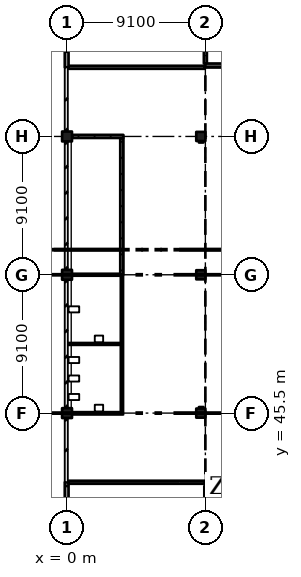
"""IFC4 building model, lengths in metres.
Left out: names, types, materials, properties, quantities, classifications, styles, units other than length and angle.
Written with IfcOpenShell. Run it as: python <this file> out.ifc"""

import sys

from ifc_helpers import new_model, si_unit, direction, frame, frame_2d, origin, origin_2d, place, context, subcontext, project, spatial, rectangle, extrude, element, fill, save


model = new_model("IFC4")
c1 = context("Model", 3, precision=1e-05, world=origin(), true_north=direction((0.0, 1.0)))
c2 = subcontext(c1, "Body", "Model", "MODEL_VIEW")
j1 = project(units=[si_unit("LENGTHUNIT", "METRE"), si_unit("PLANEANGLEUNIT", "RADIAN")], contexts=[c1])
p1 = place(None, origin())
s1 = spatial("IfcSite", under=j1, at=p1, CompositionType="ELEMENT")
p2 = place(p1, origin())
s2 = spatial("IfcBuilding", under=s1, at=p2, CompositionType="ELEMENT")
p3 = place(p2, frame((0.0, 0.0, 24.57)))
s3 = spatial("IfcBuildingStorey", under=s2, at=p3, CompositionType="ELEMENT", Elevation=24.57)
for number, where, z_axis, x_axis in (
    (1, (0.0, 45.5, 0.0), (0.0, 0.0, 1.0), (1.0, 0.0, 0.0)),
    (2, (0.0, 54.6, 0.0), (0.0, 0.0, 1.0), (1.0, 0.0, 0.0)),
    (3, (0.0, 63.7, 0.0), (0.0, 0.0, 1.0), (1.0, 0.0, 0.0)),
):
    element("IfcColumn", number, at=place(p3, frame(where, z_axis=z_axis, x_axis=x_axis)), inside=s3, PredefinedType="COLUMN", context=c2, shape_type="SweptSolid", body=[
        extrude(rectangle(XDim=0.65, YDim=0.65, at=origin_2d()), origin(), (0.0, 0.0, 1.0), 4.55),
    ])
for number, where, z_axis, x_axis in (
    (4, (8.8, 45.5, 0.0), (0.0, 0.0, 1.0), (1.0, 0.0, 0.0)),
    (5, (8.8, 54.6, 0.0), (0.0, 0.0, 1.0), (1.0, 0.0, 0.0)),
    (6, (8.8, 63.7, 0.0), (0.0, 0.0, 1.0), (1.0, 0.0, 0.0)),
):
    element("IfcColumn", number, at=place(p3, frame(where, z_axis=z_axis, x_axis=x_axis)), inside=s3, PredefinedType="COLUMN", context=c2, shape_type="SweptSolid", body=[
        extrude(rectangle(XDim=0.6, YDim=0.6, at=origin_2d()), origin(), (0.0, 0.0, 1.0), 4.55),
    ])
for number, where, z_axis, x_axis in (
    (7, (40.95, 40.825, 0.0), (0.0, 0.0, 1.0), (-1.0, 0.0, 0.0)),
    (8, (40.95, 68.375, 0.0), (0.0, 0.0, 1.0), (-1.0, 0.0, 0.0)),
):
    element("IfcWall", number, at=place(p3, frame(where, z_axis=z_axis, x_axis=x_axis)), inside=s3, PredefinedType="SHEAR", context=c2, shape_type="SweptSolid", body=[
        extrude(rectangle(XDim=31.85, YDim=0.25, at=frame_2d((15.925, 0.0))), origin(), (0.0, 0.0, 1.0), 4.55),
    ])
for number, where, z_axis, x_axis in (
    (9, (-0.025, 72.55, 0.0), (0.0, 0.0, 1.0), (0.0, -1.0, 0.0)),
    (10, (-0.025, 40.95, 0.0), (0.0, 0.0, 1.0), (0.0, -1.0, 0.0)),
):
    element("IfcWall", number, at=place(p3, frame(where, z_axis=z_axis, x_axis=x_axis)), inside=s3, PredefinedType="SOLIDWALL", context=c2, shape_type="SweptSolid", body=[
        extrude(rectangle(XDim=4.3, YDim=0.25, at=frame_2d((2.15, 0.0))), origin(), (0.0, 0.0, 1.0), 3.6),
    ])
p4 = place(p3, frame((0.03, 50.05, 0.0), z_axis=(0.0, 0.0, 1.0), x_axis=(1.0, 0.0, 0.0)))
e11 = element("IfcWall", 11, at=p4, inside=s3, PredefinedType="PARTITIONING", context=c2, shape_type="SweptSolid", body=[
    extrude(rectangle(XDim=3.508, YDim=0.125, at=frame_2d((1.754, 0.0))), origin(), (0.0, 0.0, 1.0), 3.9),
])
p5 = place(p3, frame((0.1, 40.95, 0.0), z_axis=(0.0, 0.0, 1.0), x_axis=(1.0, 0.0, 0.0)))
e12 = element("IfcWall", 12, at=p5, inside=s3, PredefinedType="PARTITIONING", context=c2, shape_type="SweptSolid", body=[
    extrude(rectangle(XDim=8.97, YDim=0.2, at=frame_2d((4.485, 0.0))), origin(), (0.0, 0.0, 1.0), 3.55),
])
p6 = place(p5, frame((4.75, 0.0, 0.0)))
e13 = element("IfcOpeningElement", 13, at=p6, cuts=e12, PredefinedType="OPENING", context=c2, shape_type="SweptSolid", body=[
    extrude(rectangle(XDim=3.0, YDim=2.4, at=frame_2d((1.5, 1.2))), frame((0.0, 0.11, 0.0), z_axis=(0.0, -1.0, 0.0), x_axis=(1.0, 0.0, 0.0)), (0.0, 0.0, 1.0), 0.22),
])
p7 = place(p5, frame((0.25, 0.0, 0.0)))
e14 = element("IfcOpeningElement", 14, at=p7, cuts=e12, PredefinedType="OPENING", context=c2, shape_type="SweptSolid", body=[
    extrude(rectangle(XDim=3.0, YDim=2.4, at=frame_2d((1.5, 1.2))), frame((0.0, 0.11, 0.0), z_axis=(0.0, -1.0, 0.0), x_axis=(1.0, 0.0, 0.0)), (0.0, 0.0, 1.0), 0.22),
])
p8 = place(p3, frame((0.325, 45.5, 0.0), z_axis=(0.0, 0.0, 1.0), x_axis=(1.0, 0.0, 0.0)))
e15 = element("IfcWall", 15, at=p8, inside=s3, PredefinedType="PARTITIONING", context=c2, shape_type="SweptSolid", body=[
    extrude(rectangle(XDim=3.338, YDim=0.125, at=frame_2d((1.669, 0.0))), origin(), (0.0, 0.0, 1.0), 3.9),
])
p9 = place(p3, frame((0.325, 54.6, 0.0), z_axis=(0.0, 0.0, 1.0), x_axis=(1.0, 0.0, 0.0)))
e16 = element("IfcWall", 16, at=p9, inside=s3, PredefinedType="PARTITIONING", context=c2, shape_type="SweptSolid", body=[
    extrude(rectangle(XDim=3.175, YDim=0.125, at=frame_2d((1.587, 0.0))), origin(), (0.0, 0.0, 1.0), 3.9),
])
p10 = place(p3, frame((3.6, 45.562, 0.0), z_axis=(0.0, 0.0, 1.0), x_axis=(0.0, 1.0, 0.0)))
e17 = element("IfcWall", 17, at=p10, inside=s3, PredefinedType="PARTITIONING", context=c2, shape_type="SweptSolid", body=[
    extrude(rectangle(XDim=9.038, YDim=0.125, at=frame_2d((4.519, 0.0))), origin(), (0.0, 0.0, 1.0), 3.9),
])
p11 = place(p10, frame((1.75, 0.0, 0.0)))
e18 = element("IfcOpeningElement", 18, at=p11, cuts=e17, PredefinedType="OPENING", context=c2, shape_type="SweptSolid", body=[
    extrude(rectangle(XDim=0.9, YDim=2.1, at=frame_2d((0.45, 1.05))), frame((0.0, 0.073, 0.0), z_axis=(0.0, -1.0, 0.0), x_axis=(1.0, 0.0, 0.0)), (0.0, 0.0, 1.0), 0.145),
])
p12 = place(p10, frame((6.238, 0.0, 0.0)))
e19 = element("IfcOpeningElement", 19, at=p12, cuts=e17, PredefinedType="OPENING", context=c2, shape_type="SweptSolid", body=[
    extrude(rectangle(XDim=1.0, YDim=2.1, at=frame_2d((0.5, 1.05))), frame((0.0, 0.073, 0.0), z_axis=(0.0, -1.0, 0.0), x_axis=(1.0, 0.0, 0.0)), (0.0, 0.0, 1.0), 0.145),
])
p13 = place(p3, frame((3.6, 54.6, 0.0), z_axis=(0.0, 0.0, 1.0), x_axis=(0.0, 1.0, 0.0)))
e20 = element("IfcWall", 20, at=p13, inside=s3, PredefinedType="PARTITIONING", context=c2, shape_type="SweptSolid", body=[
    extrude(rectangle(XDim=9.0, YDim=0.2, at=frame_2d((4.5, 0.0))), origin(), (0.0, 0.0, 1.0), 3.9),
])
p14 = place(p13, frame((3.55, 0.0, 0.0)))
e21 = element("IfcOpeningElement", 21, at=p14, cuts=e20, PredefinedType="OPENING", context=c2, shape_type="SweptSolid", body=[
    extrude(rectangle(XDim=1.8, YDim=2.1, at=frame_2d((0.9, 1.05))), frame((0.0, 0.11, 0.0), z_axis=(0.0, -1.0, 0.0), x_axis=(1.0, 0.0, 0.0)), (0.0, 0.0, 1.0), 0.22),
])
p15 = place(p3, frame((0.1, 68.25, 0.0), z_axis=(0.0, 0.0, 1.0), x_axis=(1.0, 0.0, 0.0)))
e22 = element("IfcWall", 22, at=p15, inside=s3, PredefinedType="PARTITIONING", context=c2, shape_type="SweptSolid", body=[
    extrude(rectangle(XDim=8.97, YDim=0.2, at=frame_2d((4.485, 0.0))), origin(), (0.0, 0.0, 1.0), 3.55),
])
p16 = place(p15, frame((4.72, 0.0, 0.0)))
e23 = element("IfcOpeningElement", 23, at=p16, cuts=e22, PredefinedType="OPENING", context=c2, shape_type="SweptSolid", body=[
    extrude(rectangle(XDim=3.0, YDim=2.4, at=frame_2d((1.5, 1.2))), frame((0.0, 0.11, 0.0), z_axis=(0.0, -1.0, 0.0), x_axis=(1.0, 0.0, 0.0)), (0.0, 0.0, 1.0), 0.22),
])
p17 = place(p15, frame((0.25, 0.0, 0.0)))
e24 = element("IfcOpeningElement", 24, at=p17, cuts=e22, PredefinedType="OPENING", context=c2, shape_type="SweptSolid", body=[
    extrude(rectangle(XDim=3.0, YDim=2.4, at=frame_2d((1.5, 1.2))), frame((0.0, 0.11, 0.0), z_axis=(0.0, -1.0, 0.0), x_axis=(1.0, 0.0, 0.0)), (0.0, 0.0, 1.0), 0.22),
])
p18 = place(p3, frame((3.7, 63.7, 0.0), z_axis=(0.0, 0.0, 1.0), x_axis=(-1.0, 0.0, 0.0)))
e25 = element("IfcWall", 25, at=p18, inside=s3, PredefinedType="PARTITIONING", context=c2, shape_type="SweptSolid", body=[
    extrude(rectangle(XDim=3.375, YDim=0.2, at=frame_2d((1.688, 0.0))), origin(), (0.0, 0.0, 1.0), 3.9),
])
for number, where, z_axis, x_axis in (
    (26, (8.675, 63.4, 0.0), (0.0, 0.0, 1.0), (1.0, 0.0, 0.0)),
    (27, (8.975, 45.8, 0.0), (0.0, 0.0, 1.0), (-1.0, 0.0, 0.0)),
):
    element("IfcWall", number, at=place(p3, frame(where, z_axis=z_axis, x_axis=x_axis)), inside=s3, PredefinedType="PARTITIONING", context=c2, shape_type="SweptSolid", body=[
        extrude(rectangle(XDim=0.3, YDim=0.2, at=frame_2d((0.15, 0.0))), origin(), (0.0, 0.0, 1.0), 8.43),
    ])
p19 = place(p3, frame((9.1, 36.65, 0.0), z_axis=(0.0, 0.0, 1.0), x_axis=(0.0, 1.0, 0.0)))
e28 = element("IfcWall", 28, at=p19, inside=s3, PredefinedType="SOLIDWALL", context=c2, shape_type="SweptSolid", body=[
    extrude(rectangle(XDim=4.05, YDim=0.14, at=frame_2d((2.025, 0.0))), origin(), (0.0, 0.0, 1.0), 3.6),
])
p20 = place(p3, frame((9.1, 68.5, 0.0), z_axis=(0.0, 0.0, 1.0), x_axis=(0.0, 1.0, 0.0)))
e29 = element("IfcWall", 29, at=p20, inside=s3, PredefinedType="PARTITIONING", context=c2, shape_type="SweptSolid", body=[
    extrude(rectangle(XDim=4.05, YDim=0.2, at=frame_2d((2.025, 0.0))), origin(), (0.0, 0.0, 1.0), 3.6),
])
p21 = place(p11, origin())
e30 = element("IfcDoor", 30, at=p21, inside=s3, OperationType="SINGLE_SWING_RIGHT", PredefinedType="DOOR", context=c2, shape_type="SweptSolid", body=[
    extrude(rectangle(XDim=0.9, YDim=2.1, at=frame_2d((0.45, 1.05))), frame((0.0, 0.025, 0.0), z_axis=(0.0, -1.0, 0.0), x_axis=(1.0, 0.0, 0.0)), (0.0, 0.0, 1.0), 0.05),
])
fill(e18, e30)
p22 = place(p12, origin())
e31 = element("IfcDoor", 31, at=p22, inside=s3, OperationType="SINGLE_SWING_RIGHT", PredefinedType="DOOR", context=c2, shape_type="SweptSolid", body=[
    extrude(rectangle(XDim=1.0, YDim=2.1, at=frame_2d((0.5, 1.05))), frame((0.0, 0.025, 0.0), z_axis=(0.0, -1.0, 0.0), x_axis=(1.0, 0.0, 0.0)), (0.0, 0.0, 1.0), 0.05),
])
fill(e19, e31)
p23 = place(p14, origin())
e32 = element("IfcDoor", 32, at=p23, inside=s3, OperationType="DOUBLE_DOOR_SINGLE_SWING", PredefinedType="DOOR", context=c2, shape_type="SweptSolid", body=[
    extrude(rectangle(XDim=1.8, YDim=2.1, at=frame_2d((0.9, 1.05))), frame((0.0, 0.025, 0.0), z_axis=(0.0, -1.0, 0.0), x_axis=(1.0, 0.0, 0.0)), (0.0, 0.0, 1.0), 0.05),
])
fill(e21, e32)
p24 = place(p6, origin())
e33 = element("IfcDoor", 33, at=p24, inside=s3, OperationType="DOUBLE_DOOR_SINGLE_SWING", PredefinedType="DOOR", context=c2, shape_type="SweptSolid", body=[
    extrude(rectangle(XDim=3.0, YDim=2.4, at=frame_2d((1.5, 1.2))), frame((0.0, 0.025, 0.0), z_axis=(0.0, -1.0, 0.0), x_axis=(1.0, 0.0, 0.0)), (0.0, 0.0, 1.0), 0.05),
])
fill(e13, e33)
p25 = place(p7, origin())
e34 = element("IfcDoor", 34, at=p25, inside=s3, OperationType="DOUBLE_DOOR_SINGLE_SWING", PredefinedType="DOOR", context=c2, shape_type="SweptSolid", body=[
    extrude(rectangle(XDim=3.0, YDim=2.4, at=frame_2d((1.5, 1.2))), frame((0.0, 0.025, 0.0), z_axis=(0.0, -1.0, 0.0), x_axis=(1.0, 0.0, 0.0)), (0.0, 0.0, 1.0), 0.05),
])
fill(e14, e34)
p26 = place(p16, origin())
e35 = element("IfcDoor", 35, at=p26, inside=s3, OperationType="DOUBLE_DOOR_SINGLE_SWING", PredefinedType="DOOR", context=c2, shape_type="SweptSolid", body=[
    extrude(rectangle(XDim=3.0, YDim=2.4, at=frame_2d((1.5, 1.2))), frame((0.0, 0.025, 0.0), z_axis=(0.0, -1.0, 0.0), x_axis=(1.0, 0.0, 0.0)), (0.0, 0.0, 1.0), 0.05),
])
fill(e23, e35)
p27 = place(p17, origin())
e36 = element("IfcDoor", 36, at=p27, inside=s3, OperationType="DOUBLE_DOOR_SINGLE_SWING", PredefinedType="DOOR", context=c2, shape_type="SweptSolid", body=[
    extrude(rectangle(XDim=3.0, YDim=2.4, at=frame_2d((1.5, 1.2))), frame((0.0, 0.025, 0.0), z_axis=(0.0, -1.0, 0.0), x_axis=(1.0, 0.0, 0.0)), (0.0, 0.0, 1.0), 0.05),
])
fill(e24, e36)
save(model, sys.argv[1])
